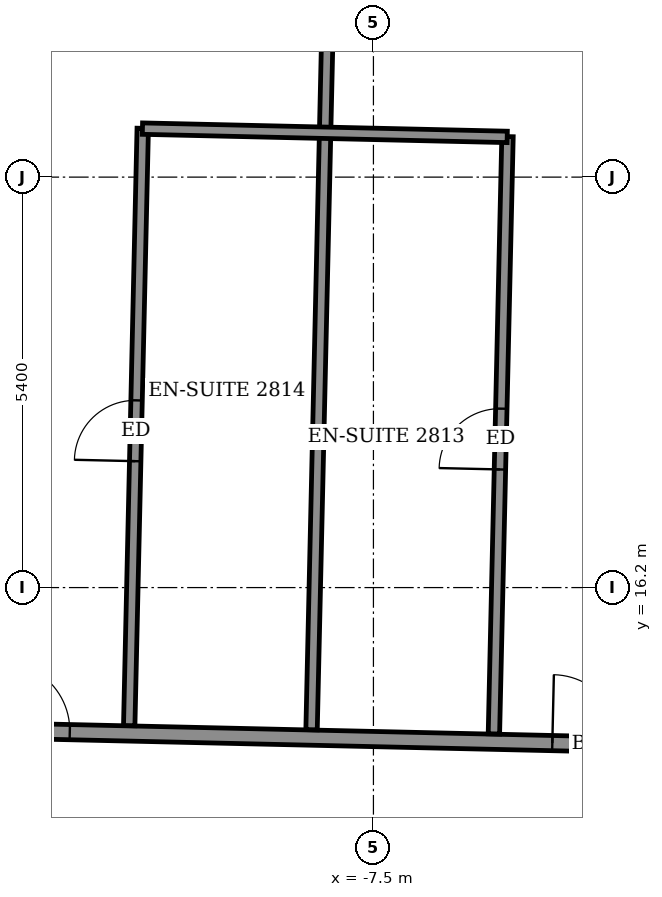
"""IFC4 building model, lengths in metres.
Left out: names, types, materials, properties, quantities, classifications, styles, units other than length and angle.
Written with IfcOpenShell. Run it as: python <this file> out.ifc"""

import sys

from ifc_helpers import new_model, si_unit, direction, frame, frame_2d, origin, place, context, subcontext, project, spatial, rectangle, extrude, element, fill, save


model = new_model("IFC4")
c1 = context("Model", 3, precision=1e-05, world=origin(), true_north=direction((0.0, 1.0)))
c2 = subcontext(c1, "Body", "Model", "MODEL_VIEW")
j1 = project(units=[si_unit("LENGTHUNIT", "METRE"), si_unit("PLANEANGLEUNIT", "RADIAN")], contexts=[c1])
p1 = place(None, origin())
s1 = spatial("IfcSite", under=j1, at=p1, CompositionType="ELEMENT")
p2 = place(p1, origin())
s2 = spatial("IfcBuilding", under=s1, at=p2, CompositionType="ELEMENT")
p3 = place(p2, frame((0.0, 0.0, 112.7)))
s3 = spatial("IfcBuildingStorey", under=s2, at=p3, CompositionType="ELEMENT", Elevation=112.7)
p4 = place(p3, frame((-26.341, 14.635, 0.0), z_axis=(0.0, 0.0, 1.0), x_axis=(0.999742553034, -0.02268981385, 0.0)))
e1 = element("IfcWall", 1, at=p4, inside=s3, PredefinedType="PARTITIONING", context=c2, shape_type="SweptSolid", body=[
    extrude(rectangle(XDim=50.733, YDim=0.2, at=frame_2d((25.366, 0.0))), origin(), (0.0, 0.0, 1.0), 3.05),
])
p5 = place(p4, frame((47.954, 0.0, 0.0)))
e2 = element("IfcOpeningElement", 2, at=p5, cuts=e1, PredefinedType="OPENING", context=c2, shape_type="SweptSolid", body=[
    extrude(rectangle(XDim=1.0, YDim=2.1, at=frame_2d((0.5, 1.05))), frame((0.0, 0.11, 0.0), z_axis=(0.0, -1.0, 0.0), x_axis=(1.0, 0.0, 0.0)), (0.0, 0.0, 1.0), 0.22),
])
p6 = place(p4, frame((43.125, 0.0, 0.0)))
e3 = element("IfcOpeningElement", 3, at=p6, cuts=e1, PredefinedType="OPENING", context=c2, shape_type="SweptSolid", body=[
    extrude(rectangle(XDim=0.9, YDim=2.1, at=frame_2d((0.45, 1.05))), frame((0.0, 0.11, 0.0), z_axis=(0.0, -1.0, 0.0), x_axis=(1.0, 0.0, 0.0)), (0.0, 0.0, 1.0), 0.22),
])
p7 = place(p4, frame((40.7, 0.0, 0.0)))
e4 = element("IfcOpeningElement", 4, at=p7, cuts=e1, PredefinedType="OPENING", context=c2, shape_type="SweptSolid", body=[
    extrude(rectangle(XDim=0.9, YDim=2.1, at=frame_2d((0.45, 1.05))), frame((0.0, 0.11, 0.0), z_axis=(0.0, -1.0, 0.0), x_axis=(1.0, 0.0, 0.0)), (0.0, 0.0, 1.0), 0.22),
])
p8 = place(p4, frame((33.425, 0.0, 0.0)))
e5 = element("IfcOpeningElement", 5, at=p8, cuts=e1, PredefinedType="OPENING", context=c2, shape_type="SweptSolid", body=[
    extrude(rectangle(XDim=0.9, YDim=2.1, at=frame_2d((0.45, 1.05))), frame((0.0, 0.11, 0.0), z_axis=(0.0, -1.0, 0.0), x_axis=(1.0, 0.0, 0.0)), (0.0, 0.0, 1.0), 0.22),
])
p9 = place(p4, frame((30.95, 0.0, 0.0)))
e6 = element("IfcOpeningElement", 6, at=p9, cuts=e1, PredefinedType="OPENING", context=c2, shape_type="SweptSolid", body=[
    extrude(rectangle(XDim=0.9, YDim=2.1, at=frame_2d((0.45, 1.05))), frame((0.0, 0.11, 0.0), z_axis=(0.0, -1.0, 0.0), x_axis=(1.0, 0.0, 0.0)), (0.0, 0.0, 1.0), 0.22),
])
p10 = place(p4, frame((23.675, 0.0, 0.0)))
e7 = element("IfcOpeningElement", 7, at=p10, cuts=e1, PredefinedType="OPENING", context=c2, shape_type="SweptSolid", body=[
    extrude(rectangle(XDim=0.9, YDim=2.1, at=frame_2d((0.45, 1.05))), frame((0.0, 0.11, 0.0), z_axis=(0.0, -1.0, 0.0), x_axis=(1.0, 0.0, 0.0)), (0.0, 0.0, 1.0), 0.22),
])
p11 = place(p4, frame((21.2, 0.0, 0.0)))
e8 = element("IfcOpeningElement", 8, at=p11, cuts=e1, PredefinedType="OPENING", context=c2, shape_type="SweptSolid", body=[
    extrude(rectangle(XDim=0.9, YDim=2.1, at=frame_2d((0.45, 1.05))), frame((0.0, 0.11, 0.0), z_axis=(0.0, -1.0, 0.0), x_axis=(1.0, 0.0, 0.0)), (0.0, 0.0, 1.0), 0.22),
])
p12 = place(p4, frame((13.95, 0.0, 0.0)))
e9 = element("IfcOpeningElement", 9, at=p12, cuts=e1, PredefinedType="OPENING", context=c2, shape_type="SweptSolid", body=[
    extrude(rectangle(XDim=0.9, YDim=2.1, at=frame_2d((0.45, 1.05))), frame((0.0, 0.11, 0.0), z_axis=(0.0, -1.0, 0.0), x_axis=(1.0, 0.0, 0.0)), (0.0, 0.0, 1.0), 0.22),
])
p13 = place(p4, frame((11.475, 0.0, 0.0)))
e10 = element("IfcOpeningElement", 10, at=p13, cuts=e1, PredefinedType="OPENING", context=c2, shape_type="SweptSolid", body=[
    extrude(rectangle(XDim=0.9, YDim=2.1, at=frame_2d((0.45, 1.05))), frame((0.0, 0.11, 0.0), z_axis=(0.0, -1.0, 0.0), x_axis=(1.0, 0.0, 0.0)), (0.0, 0.0, 1.0), 0.22),
])
p14 = place(p4, frame((1.4, 0.0, 0.0)))
e11 = element("IfcOpeningElement", 11, at=p14, cuts=e1, PredefinedType="OPENING", context=c2, shape_type="SweptSolid", body=[
    extrude(rectangle(XDim=1.0, YDim=2.1, at=frame_2d((0.5, 1.05))), frame((0.0, 0.11, 0.0), z_axis=(0.0, -1.0, 0.0), x_axis=(1.0, 0.0, 0.0)), (0.0, 0.0, 1.0), 0.22),
])
p15 = place(p4, frame((6.625, 0.0, 0.0)))
e12 = element("IfcOpeningElement", 12, at=p15, cuts=e1, PredefinedType="OPENING", context=c2, shape_type="SweptSolid", body=[
    extrude(rectangle(XDim=0.9, YDim=2.1, at=frame_2d((0.45, 1.05))), frame((0.0, 0.11, 0.0), z_axis=(0.0, -1.0, 0.0), x_axis=(1.0, 0.0, 0.0)), (0.0, 0.0, 1.0), 0.22),
])
p16 = place(p3, frame((-10.713, 14.384, 0.0), z_axis=(0.0, 0.0, 1.0), x_axis=(0.022643791768, 0.999743596476, 0.0)))
e13 = element("IfcWall", 13, at=p16, inside=s3, PredefinedType="PARTITIONING", context=c2, shape_type="SweptSolid", body=[
    extrude(rectangle(XDim=7.86, YDim=0.15, at=frame_2d((3.93, 0.0))), origin(), (0.0, 0.0, 1.0), 3.05),
])
p17 = place(p16, frame((3.48, 0.0, 0.0)))
e14 = element("IfcOpeningElement", 14, at=p17, cuts=e13, PredefinedType="OPENING", context=c2, shape_type="SweptSolid", body=[
    extrude(rectangle(XDim=0.8, YDim=2.1, at=frame_2d((0.4, 1.05))), frame((0.0, 0.085, 0.0), z_axis=(0.0, -1.0, 0.0), x_axis=(1.0, 0.0, 0.0)), (0.0, 0.0, 1.0), 0.17),
])
p18 = place(p3, frame((-8.314, 14.33, 0.0), z_axis=(0.0, 0.0, 1.0), x_axis=(0.022684842063, 0.99974266586, 0.0)))
e15 = element("IfcWall", 15, at=p18, inside=s3, PredefinedType="PARTITIONING", context=c2, shape_type="SweptSolid", body=[
    extrude(rectangle(XDim=11.376, YDim=0.15, at=frame_2d((5.688, 0.0))), origin(), (0.0, 0.0, 1.0), 2.55),
])
p19 = place(p3, frame((-5.915, 14.275, 0.0), z_axis=(0.0, 0.0, 1.0), x_axis=(0.022767266309, 0.999740792198, 0.0)))
e16 = element("IfcWall", 16, at=p19, inside=s3, PredefinedType="PARTITIONING", context=c2, shape_type="SweptSolid", body=[
    extrude(rectangle(XDim=7.86, YDim=0.15, at=frame_2d((3.93, 0.0))), origin(), (0.0, 0.0, 1.0), 3.05),
])
p20 = place(p19, frame((3.48, 0.0, 0.0)))
e17 = element("IfcOpeningElement", 17, at=p20, cuts=e16, PredefinedType="OPENING", context=c2, shape_type="SweptSolid", body=[
    extrude(rectangle(XDim=0.8, YDim=2.1, at=frame_2d((0.4, 1.05))), frame((0.0, 0.085, 0.0), z_axis=(0.0, -1.0, 0.0), x_axis=(1.0, 0.0, 0.0)), (0.0, 0.0, 1.0), 0.17),
])
p21 = place(p3, frame((-10.539, 22.238, 0.0), z_axis=(0.0, 0.0, 1.0), x_axis=(0.99974154664, -0.022734113616, 0.0)))
e18 = element("IfcWall", 18, at=p21, inside=s3, PredefinedType="PARTITIONING", context=c2, shape_type="SweptSolid", body=[
    extrude(rectangle(XDim=4.8, YDim=0.15, at=frame_2d((2.4, 0.0))), origin(), (0.0, 0.0, 1.0), 3.05),
])
p22 = place(p11, origin())
e19 = element("IfcDoor", 19, at=p22, inside=s3, OperationType="SINGLE_SWING_LEFT", PredefinedType="DOOR", context=c2, shape_type="SweptSolid", body=[
    extrude(rectangle(XDim=0.9, YDim=2.1, at=frame_2d((0.45, 1.05))), frame((0.0, 0.025, 0.0), z_axis=(0.0, -1.0, 0.0), x_axis=(1.0, 0.0, 0.0)), (0.0, 0.0, 1.0), 0.05),
])
fill(e8, e19)
p23 = place(p20, origin())
e20 = element("IfcDoor", 20, at=p23, inside=s3, OperationType="SINGLE_SWING_LEFT", PredefinedType="DOOR", context=c2, shape_type="SweptSolid", body=[
    extrude(rectangle(XDim=0.8, YDim=2.1, at=frame_2d((0.4, 1.05))), frame((0.0, 0.025, 0.0), z_axis=(0.0, -1.0, 0.0), x_axis=(1.0, 0.0, 0.0)), (0.0, 0.0, 1.0), 0.05),
])
fill(e17, e20)
p24 = place(p12, origin())
e21 = element("IfcDoor", 21, at=p24, inside=s3, OperationType="SINGLE_SWING_RIGHT", PredefinedType="DOOR", context=c2, shape_type="SweptSolid", body=[
    extrude(rectangle(XDim=0.9, YDim=2.1, at=frame_2d((0.45, 1.05))), frame((0.0, 0.025, 0.0), z_axis=(0.0, -1.0, 0.0), x_axis=(1.0, 0.0, 0.0)), (0.0, 0.0, 1.0), 0.05),
])
fill(e9, e21)
p25 = place(p17, origin())
e22 = element("IfcDoor", 22, at=p25, inside=s3, OperationType="SINGLE_SWING_RIGHT", PredefinedType="DOOR", context=c2, shape_type="SweptSolid", body=[
    extrude(rectangle(XDim=0.8, YDim=2.1, at=frame_2d((0.4, 1.05))), frame((0.0, 0.025, 0.0), z_axis=(0.0, -1.0, 0.0), x_axis=(1.0, 0.0, 0.0)), (0.0, 0.0, 1.0), 0.05),
])
fill(e14, e22)
save(model, sys.argv[1])
